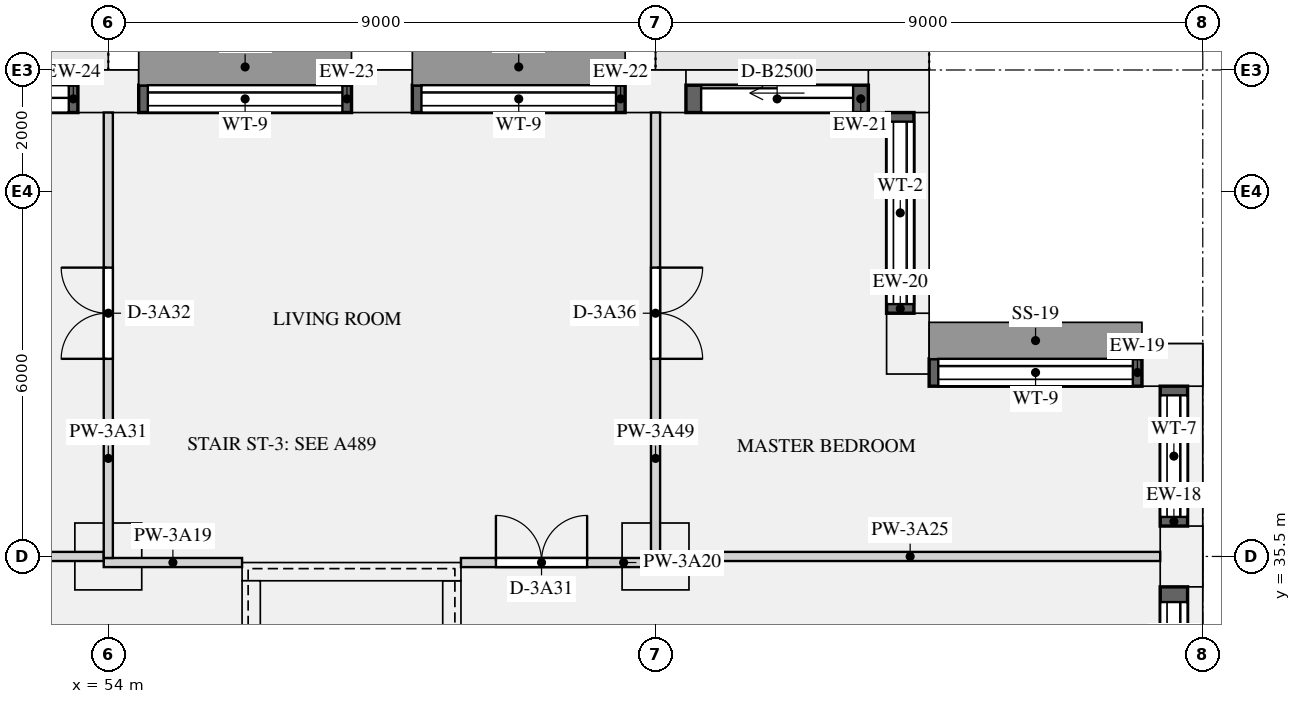
"""IFC4 building model, lengths in metres.
Left out: names, types, materials, properties, quantities, classifications, styles, units other than length and angle.
Written with IfcOpenShell. Run it as: python <this file> out.ifc"""

import sys

from ifc_helpers import new_model, si_unit, direction, frame, frame_2d, origin, origin_2d, place, context, subcontext, project, spatial, rectangle, extrude, element, fill, save


model = new_model("IFC4")
c1 = context("Model", 3, precision=1e-05, world=origin(), true_north=direction((0.0, 1.0)))
c2 = subcontext(c1, "Body", "Model", "MODEL_VIEW")
j1 = project(units=[si_unit("LENGTHUNIT", "METRE"), si_unit("PLANEANGLEUNIT", "RADIAN")], contexts=[c1])
p1 = place(None, origin())
s1 = spatial("IfcSite", under=j1, at=p1, CompositionType="ELEMENT")
p2 = place(p1, origin())
s2 = spatial("IfcBuilding", under=s1, at=p2, CompositionType="ELEMENT")
p3 = place(p2, frame((0.0, 0.0, 144.45)))
s3 = spatial("IfcBuildingStorey", under=s2, at=p3, CompositionType="ELEMENT", Elevation=144.45)
for number, where, z_axis, x_axis in (
    (1, (71.65, 35.5, 0.0), (0.0, 0.0, 1.0), (0.0, 1.0, 0.0)),
    (2, (71.5, 38.65, 0.0), (0.0, 0.0, 1.0), (-1.0, 0.0, 0.0)),
    (3, (67.15, 39.0, 0.0), (0.0, 0.0, 1.0), (0.0, 1.0, 0.0)),
    (4, (67.0, 43.15, 0.0), (0.0, 0.0, 1.0), (-1.0, 0.0, 0.0)),
    (5, (63.0, 43.15, 0.0), (0.0, 0.0, 1.0), (-1.0, 0.0, 0.0)),
    (6, (58.5, 43.15, 0.0), (0.0, 0.0, 1.0), (-1.0, 0.0, 0.0)),
    (7, (54.0, 43.15, 0.0), (0.0, 0.0, 1.0), (-1.0, 0.0, 0.0)),
):
    element("IfcColumn", number, at=place(p3, frame(where, z_axis=z_axis, x_axis=x_axis)), inside=s3, PredefinedType="USERDEFINED", context=c2, shape_type="SweptSolid", body=[
        extrude(rectangle(XDim=1.0, YDim=0.7, at=origin_2d()), origin(), (0.0, 0.0, 1.0), 3.15),
    ])
for number, where, z_axis, x_axis in (
    (8, (54.0, 35.5, 0.0), (0.0, 0.0, 1.0), (1.0, 0.0, 0.0)),
    (9, (63.0, 35.5, 0.0), (0.0, 0.0, 1.0), (1.0, 0.0, 0.0)),
):
    element("IfcColumn", number, at=place(p3, frame(where, z_axis=z_axis, x_axis=x_axis)), inside=s3, PredefinedType="COLUMN", context=c2, shape_type="SweptSolid", body=[
        extrude(rectangle(XDim=1.1, YDim=1.1, at=origin_2d()), origin(), (0.0, 0.0, 1.0), 3.15),
    ])
p4 = place(p3, frame((56.2, 35.25, 0.0), z_axis=(0.0, 0.0, 1.0), x_axis=(1.0, 0.0, 0.0)))
e10 = element("IfcWall", 10, at=p4, inside=s3, PredefinedType="SHEAR", context=c2, shape_type="SweptSolid", body=[
    extrude(rectangle(XDim=3.6, YDim=0.3, at=frame_2d((1.8, 0.0))), origin(), (0.0, 0.0, 1.0), 3.15),
])
for number, where, z_axis, x_axis in (
    (11, (56.35, 27.3, 0.0), (0.0, 0.0, 1.0), (0.0, 1.0, 0.0)),
    (12, (59.65, 27.3, 0.0), (0.0, 0.0, 1.0), (0.0, 1.0, 0.0)),
):
    element("IfcWall", number, at=place(p3, frame(where, z_axis=z_axis, x_axis=x_axis)), inside=s3, PredefinedType="SHEAR", context=c2, shape_type="SweptSolid", body=[
        extrude(rectangle(XDim=7.8, YDim=0.3, at=frame_2d((3.9, 0.0))), origin(), (0.0, 0.0, 1.0), 3.15),
    ])
p5 = place(p3, frame((71.525, 32.5, 0.9), z_axis=(0.0, 0.0, 1.0), x_axis=(0.0, 1.0, 0.0)))
e13 = element("IfcWall", 13, at=p5, inside=s3, PredefinedType="SOLIDWALL", context=c2, shape_type="SweptSolid", body=[
    extrude(rectangle(XDim=2.5, YDim=0.45, at=frame_2d((1.25, 0.0))), origin(), (0.0, 0.0, 1.0), 1.93),
])
p6 = place(p5, frame((0.25, 0.0, 0.15)))
e14 = element("IfcOpeningElement", 14, at=p6, cuts=e13, PredefinedType="OPENING", context=c2, shape_type="SweptSolid", body=[
    extrude(rectangle(XDim=2.0, YDim=1.5, at=frame_2d((1.0, 0.75))), frame((0.0, 0.235, 0.0), z_axis=(0.0, -1.0, 0.0), x_axis=(1.0, 0.0, 0.0)), (0.0, 0.0, 1.0), 0.47),
])
p7 = place(p3, frame((71.525, 36.0, 0.9), z_axis=(0.0, 0.0, 1.0), x_axis=(0.0, 1.0, 0.0)))
e15 = element("IfcWall", 15, at=p7, inside=s3, PredefinedType="SOLIDWALL", context=c2, shape_type="SweptSolid", body=[
    extrude(rectangle(XDim=2.3, YDim=0.45, at=frame_2d((1.15, 0.0))), origin(), (0.0, 0.0, 1.0), 1.93),
])
p8 = place(p7, frame((0.15, 0.0, 0.15)))
e16 = element("IfcOpeningElement", 16, at=p8, cuts=e15, PredefinedType="OPENING", context=c2, shape_type="SweptSolid", body=[
    extrude(rectangle(XDim=2.0, YDim=1.5, at=frame_2d((1.0, 0.75))), frame((0.0, 0.235, 0.0), z_axis=(0.0, -1.0, 0.0), x_axis=(1.0, 0.0, 0.0)), (0.0, 0.0, 1.0), 0.47),
])
p9 = place(p3, frame((71.0, 38.525, 0.9), z_axis=(0.0, 0.0, 1.0), x_axis=(-1.0, 0.0, 0.0)))
e17 = element("IfcWall", 17, at=p9, inside=s3, PredefinedType="SOLIDWALL", context=c2, shape_type="SweptSolid", body=[
    extrude(rectangle(XDim=3.5, YDim=0.45, at=frame_2d((1.75, 0.0))), origin(), (0.0, 0.0, 1.0), 1.93),
])
p10 = place(p9, frame((0.15, 0.0, 0.15)))
e18 = element("IfcOpeningElement", 18, at=p10, cuts=e17, PredefinedType="OPENING", context=c2, shape_type="SweptSolid", body=[
    extrude(rectangle(XDim=3.2, YDim=1.5, at=frame_2d((1.6, 0.75))), frame((0.0, 0.235, 0.0), z_axis=(0.0, -1.0, 0.0), x_axis=(1.0, 0.0, 0.0)), (0.0, 0.0, 1.0), 0.47),
])
p11 = place(p3, frame((67.025, 39.5, 0.9), z_axis=(0.0, 0.0, 1.0), x_axis=(0.0, 1.0, 0.0)))
e19 = element("IfcWall", 19, at=p11, inside=s3, PredefinedType="SOLIDWALL", context=c2, shape_type="SweptSolid", body=[
    extrude(rectangle(XDim=3.3, YDim=0.45, at=frame_2d((1.65, 0.0))), origin(), (0.0, 0.0, 1.0), 1.93),
])
p12 = place(p11, frame((0.15, 0.0, 0.15)))
e20 = element("IfcOpeningElement", 20, at=p12, cuts=e19, PredefinedType="OPENING", context=c2, shape_type="SweptSolid", body=[
    extrude(rectangle(XDim=3.0, YDim=1.5, at=frame_2d((1.5, 0.75))), frame((0.0, 0.235, 0.0), z_axis=(0.0, -1.0, 0.0), x_axis=(1.0, 0.0, 0.0)), (0.0, 0.0, 1.0), 0.47),
])
p13 = place(p3, frame((66.5, 43.025, 0.0), z_axis=(0.0, 0.0, 1.0), x_axis=(-1.0, 0.0, 0.0)))
e21 = element("IfcWall", 21, at=p13, inside=s3, PredefinedType="SOLIDWALL", context=c2, shape_type="SweptSolid", body=[
    extrude(rectangle(XDim=3.0, YDim=0.45, at=frame_2d((1.5, 0.0))), origin(), (0.0, 0.0, 1.0), 2.83),
])
p14 = place(p13, frame((0.25, 0.0, 0.0)))
e22 = element("IfcOpeningElement", 22, at=p14, cuts=e21, PredefinedType="OPENING", context=c2, shape_type="SweptSolid", body=[
    extrude(rectangle(XDim=2.5, YDim=2.3, at=frame_2d((1.25, 1.15))), frame((0.0, 0.235, 0.0), z_axis=(0.0, -1.0, 0.0), x_axis=(1.0, 0.0, 0.0)), (0.0, 0.0, 1.0), 0.47),
])
p15 = place(p3, frame((62.5, 43.025, 0.9), z_axis=(0.0, 0.0, 1.0), x_axis=(-1.0, 0.0, 0.0)))
e23 = element("IfcWall", 23, at=p15, inside=s3, PredefinedType="SOLIDWALL", context=c2, shape_type="SweptSolid", body=[
    extrude(rectangle(XDim=3.5, YDim=0.45, at=frame_2d((1.75, 0.0))), origin(), (0.0, 0.0, 1.0), 1.93),
])
p16 = place(p15, frame((0.15, 0.0, 0.15)))
e24 = element("IfcOpeningElement", 24, at=p16, cuts=e23, PredefinedType="OPENING", context=c2, shape_type="SweptSolid", body=[
    extrude(rectangle(XDim=3.2, YDim=1.5, at=frame_2d((1.6, 0.75))), frame((0.0, 0.235, 0.0), z_axis=(0.0, -1.0, 0.0), x_axis=(1.0, 0.0, 0.0)), (0.0, 0.0, 1.0), 0.47),
])
p17 = place(p3, frame((58.0, 43.025, 0.9), z_axis=(0.0, 0.0, 1.0), x_axis=(-1.0, 0.0, 0.0)))
e25 = element("IfcWall", 25, at=p17, inside=s3, PredefinedType="SOLIDWALL", context=c2, shape_type="SweptSolid", body=[
    extrude(rectangle(XDim=3.5, YDim=0.45, at=frame_2d((1.75, 0.0))), origin(), (0.0, 0.0, 1.0), 1.93),
])
p18 = place(p17, frame((0.15, 0.0, 0.15)))
e26 = element("IfcOpeningElement", 26, at=p18, cuts=e25, PredefinedType="OPENING", context=c2, shape_type="SweptSolid", body=[
    extrude(rectangle(XDim=3.2, YDim=1.5, at=frame_2d((1.6, 0.75))), frame((0.0, 0.235, 0.0), z_axis=(0.0, -1.0, 0.0), x_axis=(1.0, 0.0, 0.0)), (0.0, 0.0, 1.0), 0.47),
])
p19 = place(p3, frame((53.5, 43.025, 0.0), z_axis=(0.0, 0.0, 1.0), x_axis=(-1.0, 0.0, 0.0)))
e27 = element("IfcWall", 27, at=p19, inside=s3, PredefinedType="SOLIDWALL", context=c2, shape_type="SweptSolid", body=[
    extrude(rectangle(XDim=3.5, YDim=0.45, at=frame_2d((1.75, 0.0))), origin(), (0.0, 0.0, 1.0), 2.83),
])
p20 = place(p19, frame((0.15, 0.0, 0.0)))
e28 = element("IfcOpeningElement", 28, at=p20, cuts=e27, PredefinedType="OPENING", context=c2, shape_type="SweptSolid", body=[
    extrude(rectangle(XDim=3.2, YDim=2.3, at=frame_2d((1.6, 1.15))), frame((0.0, 0.235, 0.0), z_axis=(0.0, -1.0, 0.0), x_axis=(1.0, 0.0, 0.0)), (0.0, 0.0, 1.0), 0.47),
])
p21 = place(p3, frame((53.925, 35.4, 0.0), z_axis=(0.0, 0.0, 1.0), x_axis=(1.0, 0.0, 0.0)))
e29 = element("IfcWall", 29, at=p21, inside=s3, PredefinedType="PARTITIONING", context=c2, shape_type="SweptSolid", body=[
    extrude(rectangle(XDim=2.275, YDim=0.15, at=frame_2d((1.137, 0.0))), origin(), (0.0, 0.0, 1.0), 2.83),
])
p22 = place(p3, frame((59.8, 35.4, 0.0), z_axis=(0.0, 0.0, 1.0), x_axis=(1.0, 0.0, 0.0)))
e30 = element("IfcWall", 30, at=p22, inside=s3, PredefinedType="PARTITIONING", context=c2, shape_type="SweptSolid", body=[
    extrude(rectangle(XDim=3.275, YDim=0.15, at=frame_2d((1.637, 0.0))), origin(), (0.0, 0.0, 1.0), 2.83),
])
p23 = place(p22, frame((0.575, 0.0, 0.0)))
e31 = element("IfcOpeningElement", 31, at=p23, cuts=e30, PredefinedType="OPENING", context=c2, shape_type="SweptSolid", body=[
    extrude(rectangle(XDim=1.5, YDim=2.1, at=frame_2d((0.75, 1.05))), frame((0.0, 0.085, 0.0), z_axis=(0.0, -1.0, 0.0), x_axis=(1.0, 0.0, 0.0)), (0.0, 0.0, 1.0), 0.17),
])
p24 = place(p3, frame((45.0, 35.5, 0.0), z_axis=(0.0, 0.0, 1.0), x_axis=(1.0, 0.0, 0.0)))
e32 = element("IfcWall", 32, at=p24, inside=s3, PredefinedType="PARTITIONING", context=c2, shape_type="SweptSolid", body=[
    extrude(rectangle(XDim=8.925, YDim=0.15, at=frame_2d((4.462, 0.0))), origin(), (0.0, 0.0, 1.0), 2.83),
])
p25 = place(p24, frame((5.275, 0.0, 0.0)))
e33 = element("IfcOpeningElement", 33, at=p25, cuts=e32, PredefinedType="OPENING", context=c2, shape_type="SweptSolid", body=[
    extrude(rectangle(XDim=0.9, YDim=2.1, at=frame_2d((0.45, 1.05))), frame((0.0, 0.085, 0.0), z_axis=(0.0, -1.0, 0.0), x_axis=(1.0, 0.0, 0.0)), (0.0, 0.0, 1.0), 0.17),
])
p26 = place(p24, frame((1.325, 0.0, 0.0)))
e34 = element("IfcOpeningElement", 34, at=p26, cuts=e32, PredefinedType="OPENING", context=c2, shape_type="SweptSolid", body=[
    extrude(rectangle(XDim=0.9, YDim=2.1, at=frame_2d((0.45, 1.05))), frame((0.0, 0.085, 0.0), z_axis=(0.0, -1.0, 0.0), x_axis=(1.0, 0.0, 0.0)), (0.0, 0.0, 1.0), 0.17),
])
p27 = place(p3, frame((63.075, 35.5, 0.0), z_axis=(0.0, 0.0, 1.0), x_axis=(1.0, 0.0, 0.0)))
e35 = element("IfcWall", 35, at=p27, inside=s3, PredefinedType="PARTITIONING", context=c2, shape_type="SweptSolid", body=[
    extrude(rectangle(XDim=8.225, YDim=0.15, at=frame_2d((4.113, 0.0))), origin(), (0.0, 0.0, 1.0), 2.83),
])
p28 = place(p3, frame((54.0, 35.475, 0.0), z_axis=(0.0, 0.0, 1.0), x_axis=(0.0, 1.0, 0.0)))
e36 = element("IfcWall", 36, at=p28, inside=s3, PredefinedType="PARTITIONING", context=c2, shape_type="SweptSolid", body=[
    extrude(rectangle(XDim=7.325, YDim=0.15, at=frame_2d((3.663, 0.0))), origin(), (0.0, 0.0, 1.0), 2.83),
])
p29 = place(p28, frame((3.275, 0.0, 0.0)))
e37 = element("IfcOpeningElement", 37, at=p29, cuts=e36, PredefinedType="OPENING", context=c2, shape_type="SweptSolid", body=[
    extrude(rectangle(XDim=1.5, YDim=2.1, at=frame_2d((0.75, 1.05))), frame((0.0, 0.085, 0.0), z_axis=(0.0, -1.0, 0.0), x_axis=(1.0, 0.0, 0.0)), (0.0, 0.0, 1.0), 0.17),
])
p30 = place(p3, frame((63.0, 35.475, 0.0), z_axis=(0.0, 0.0, 1.0), x_axis=(0.0, 1.0, 0.0)))
e38 = element("IfcWall", 38, at=p30, inside=s3, PredefinedType="PARTITIONING", context=c2, shape_type="SweptSolid", body=[
    extrude(rectangle(XDim=7.325, YDim=0.15, at=frame_2d((3.663, 0.0))), origin(), (0.0, 0.0, 1.0), 2.83),
])
p31 = place(p30, frame((3.275, 0.0, 0.0)))
e39 = element("IfcOpeningElement", 39, at=p31, cuts=e38, PredefinedType="OPENING", context=c2, shape_type="SweptSolid", body=[
    extrude(rectangle(XDim=1.5, YDim=2.1, at=frame_2d((0.75, 1.05))), frame((0.0, 0.085, 0.0), z_axis=(0.0, -1.0, 0.0), x_axis=(1.0, 0.0, 0.0)), (0.0, 0.0, 1.0), 0.17),
])
p32 = place(p6, origin())
e40 = element("IfcWindow", 40, at=p32, inside=s3, PartitioningType="SINGLE_PANEL", PredefinedType="WINDOW", context=c2, shape_type="SweptSolid", body=[
    extrude(rectangle(XDim=2.0, YDim=1.5, at=frame_2d((1.0, 0.75))), frame((0.0, -0.065, 0.0), z_axis=(0.0, -1.0, 0.0), x_axis=(1.0, 0.0, 0.0)), (0.0, 0.0, 1.0), 0.06),
])
fill(e14, e40)
p33 = place(p8, origin())
e41 = element("IfcWindow", 41, at=p33, inside=s3, PartitioningType="SINGLE_PANEL", PredefinedType="WINDOW", context=c2, shape_type="SweptSolid", body=[
    extrude(rectangle(XDim=2.0, YDim=1.5, at=frame_2d((1.0, 0.75))), frame((0.0, -0.065, 0.0), z_axis=(0.0, -1.0, 0.0), x_axis=(1.0, 0.0, 0.0)), (0.0, 0.0, 1.0), 0.06),
])
fill(e16, e41)
p34 = place(p10, origin())
e42 = element("IfcWindow", 42, at=p34, inside=s3, PartitioningType="SINGLE_PANEL", PredefinedType="WINDOW", context=c2, shape_type="SweptSolid", body=[
    extrude(rectangle(XDim=3.2, YDim=1.5, at=frame_2d((1.6, 0.75))), frame((0.0, -0.065, 0.0), z_axis=(0.0, -1.0, 0.0), x_axis=(1.0, 0.0, 0.0)), (0.0, 0.0, 1.0), 0.06),
])
fill(e18, e42)
p35 = place(p12, origin())
e43 = element("IfcWindow", 43, at=p35, inside=s3, PartitioningType="SINGLE_PANEL", PredefinedType="WINDOW", context=c2, shape_type="SweptSolid", body=[
    extrude(rectangle(XDim=3.0, YDim=1.5, at=frame_2d((1.5, 0.75))), frame((0.0, -0.065, 0.0), z_axis=(0.0, -1.0, 0.0), x_axis=(1.0, 0.0, 0.0)), (0.0, 0.0, 1.0), 0.06),
])
fill(e20, e43)
p36 = place(p14, origin())
e44 = element("IfcDoor", 44, at=p36, inside=s3, OperationType="SLIDING_TO_LEFT", PredefinedType="DOOR", context=c2, shape_type="SweptSolid", body=[
    extrude(rectangle(XDim=2.5, YDim=2.3, at=frame_2d((1.25, 1.15))), frame((0.0, -0.07, 0.0), z_axis=(0.0, -1.0, 0.0), x_axis=(1.0, 0.0, 0.0)), (0.0, 0.0, 1.0), 0.05),
])
fill(e22, e44)
p37 = place(p16, origin())
e45 = element("IfcWindow", 45, at=p37, inside=s3, PartitioningType="SINGLE_PANEL", PredefinedType="WINDOW", context=c2, shape_type="SweptSolid", body=[
    extrude(rectangle(XDim=3.2, YDim=1.5, at=frame_2d((1.6, 0.75))), frame((0.0, -0.065, 0.0), z_axis=(0.0, -1.0, 0.0), x_axis=(1.0, 0.0, 0.0)), (0.0, 0.0, 1.0), 0.06),
])
fill(e24, e45)
p38 = place(p18, origin())
e46 = element("IfcWindow", 46, at=p38, inside=s3, PartitioningType="SINGLE_PANEL", PredefinedType="WINDOW", context=c2, shape_type="SweptSolid", body=[
    extrude(rectangle(XDim=3.2, YDim=1.5, at=frame_2d((1.6, 0.75))), frame((0.0, -0.065, 0.0), z_axis=(0.0, -1.0, 0.0), x_axis=(1.0, 0.0, 0.0)), (0.0, 0.0, 1.0), 0.06),
])
fill(e26, e46)
p39 = place(p20, origin())
e47 = element("IfcDoor", 47, at=p39, inside=s3, OperationType="SLIDING_TO_LEFT", PredefinedType="DOOR", context=c2, shape_type="SweptSolid", body=[
    extrude(rectangle(XDim=3.2, YDim=2.3, at=frame_2d((1.6, 1.15))), frame((0.0, -0.07, 0.0), z_axis=(0.0, -1.0, 0.0), x_axis=(1.0, 0.0, 0.0)), (0.0, 0.0, 1.0), 0.05),
])
fill(e28, e47)
p40 = place(p23, origin())
e48 = element("IfcDoor", 48, at=p40, inside=s3, OperationType="DOUBLE_DOOR_SINGLE_SWING", PredefinedType="DOOR", context=c2, shape_type="SweptSolid", body=[
    extrude(rectangle(XDim=1.5, YDim=2.1, at=frame_2d((0.75, 1.05))), frame((0.0, 0.025, 0.0), z_axis=(0.0, -1.0, 0.0), x_axis=(1.0, 0.0, 0.0)), (0.0, 0.0, 1.0), 0.05),
])
fill(e31, e48)
p41 = place(p29, origin())
e49 = element("IfcDoor", 49, at=p41, inside=s3, OperationType="DOUBLE_DOOR_SINGLE_SWING", PredefinedType="DOOR", context=c2, shape_type="SweptSolid", body=[
    extrude(rectangle(XDim=1.5, YDim=2.1, at=frame_2d((0.75, 1.05))), frame((0.0, 0.025, 0.0), z_axis=(0.0, -1.0, 0.0), x_axis=(1.0, 0.0, 0.0)), (0.0, 0.0, 1.0), 0.05),
])
fill(e37, e49)
p42 = place(p31, frame((1.5, 0.0, 0.0), z_axis=(0.0, 0.0, 1.0), x_axis=(-1.0, 0.0, 0.0)))
e50 = element("IfcDoor", 50, at=p42, inside=s3, OperationType="DOUBLE_DOOR_SINGLE_SWING", PredefinedType="DOOR", context=c2, shape_type="SweptSolid", body=[
    extrude(rectangle(XDim=1.5, YDim=2.1, at=frame_2d((0.75, 1.05))), frame((0.0, 0.025, 0.0), z_axis=(0.0, -1.0, 0.0), x_axis=(1.0, 0.0, 0.0)), (0.0, 0.0, 1.0), 0.05),
])
fill(e39, e50)
save(model, sys.argv[1])
